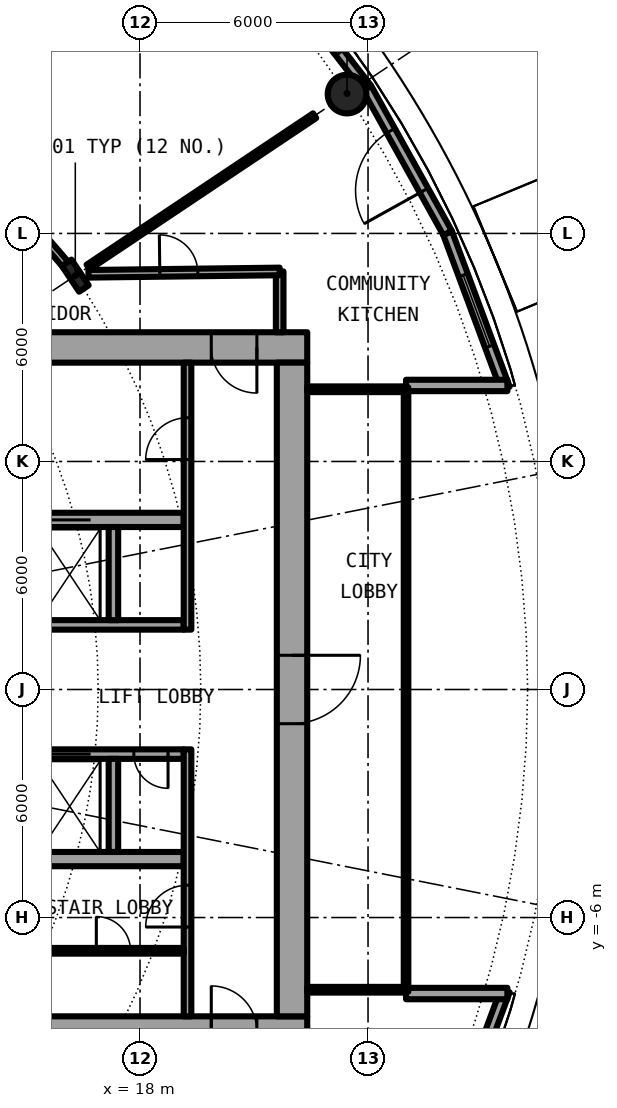
"""IFC4 building model, lengths in metres.
Left out: names, types, materials, properties, quantities, classifications, styles, units other than length and angle.
Written with IfcOpenShell. Run it as: python <this file> out.ifc"""

import sys

from ifc_helpers import new_model, si_unit, direction, frame, frame_2d, origin, origin_2d, place, context, subcontext, project, spatial, rectangle, hollow_circle, i_section, extrude, element, fill, save


model = new_model("IFC4")
c1 = context("Model", 3, precision=1e-05, world=origin(), true_north=direction((0.0, 1.0)))
c2 = subcontext(c1, "Body", "Model", "MODEL_VIEW")
j1 = project(units=[si_unit("LENGTHUNIT", "METRE"), si_unit("PLANEANGLEUNIT", "RADIAN")], contexts=[c1])
p1 = place(None, origin())
s1 = spatial("IfcSite", under=j1, at=p1, CompositionType="ELEMENT")
p2 = place(p1, origin())
s2 = spatial("IfcBuilding", under=s1, at=p2, CompositionType="ELEMENT")
p3 = place(p2, frame((0.0, 0.0, 9.6)))
s3 = spatial("IfcBuildingStorey", under=s2, at=p3, CompositionType="ELEMENT", Elevation=9.6)
p4 = place(p3, frame((23.448, 15.667, 0.0), z_axis=(0.0, 0.0, 1.0), x_axis=(1.0, 0.0, 0.0)))
e1 = element("IfcColumn", 1, at=p4, inside=s3, PredefinedType="COLUMN", context=c2, shape_type="SweptSolid", body=[
    extrude(hollow_circle(Radius=0.508, WallThickness=0.05, at=origin_2d()), origin(), (0.0, 0.0, 1.0), 4.5),
])
p5 = place(p3, frame((16.297, 10.889, 0.0), z_axis=(0.0, 0.0, 1.0), x_axis=(0.831469612303, 0.55557023302, 0.0)))
e2 = element("IfcColumn", 2, at=p5, inside=s3, PredefinedType="COLUMN", context=c2, shape_type="SweptSolid", body=[
    extrude(i_section(OverallWidth=0.303, OverallDepth=0.814, WebThickness=0.021, FlangeThickness=0.04, FilletRadius=0.03, at=origin_2d()), origin(), (0.0, 0.0, 1.0), 4.5),
])
p6 = place(p3, frame((27.61, 7.924, 0.0), z_axis=(0.0, 0.0, 1.0), x_axis=(-0.348003729264, 0.937493148998, 0.0)))
e3 = element("IfcWall", 3, at=p6, inside=s3, PredefinedType="SOLIDWALL", context=c2, shape_type="SweptSolid", body=[
    extrude(rectangle(XDim=4.359, YDim=0.25, at=frame_2d((2.18, 0.0))), origin(), (0.0, 0.0, 1.0), 4.05),
])
p7 = place(p6, frame((1.18, 0.0, 0.9)))
e4 = element("IfcOpeningElement", 4, at=p7, cuts=e3, PredefinedType="OPENING", context=c2, shape_type="SweptSolid", body=[
    extrude(rectangle(XDim=2.0, YDim=2.4, at=frame_2d((1.0, 1.2))), frame((0.0, 0.135, 0.0), z_axis=(0.0, -1.0, 0.0), x_axis=(1.0, 0.0, 0.0)), (0.0, 0.0, 1.0), 0.27),
])
p8 = place(p3, frame((26.093, 12.011, 0.0), z_axis=(0.0, 0.0, 1.0), x_axis=(-0.485761785263, 0.8740912355, 0.0)))
e5 = element("IfcWall", 5, at=p8, inside=s3, PredefinedType="SOLIDWALL", context=c2, shape_type="SweptSolid", body=[
    extrude(rectangle(XDim=4.36, YDim=0.25, at=frame_2d((2.18, 0.0))), origin(), (0.0, 0.0, 1.0), 4.05),
])
p9 = place(p8, frame((1.28, 0.0, 0.0)))
e6 = element("IfcOpeningElement", 6, at=p9, cuts=e5, PredefinedType="OPENING", context=c2, shape_type="SweptSolid", body=[
    extrude(rectangle(XDim=1.8, YDim=2.2, at=frame_2d((0.9, 1.1))), frame((0.0, 0.135, 0.0), z_axis=(0.0, -1.0, 0.0), x_axis=(1.0, 0.0, 0.0)), (0.0, 0.0, 1.0), 0.27),
])
p10 = place(p3, frame((23.975, 15.822, 0.0), z_axis=(0.0, 0.0, 1.0), x_axis=(-0.612637256412, 0.790364214812, 0.0)))
e7 = element("IfcWall", 7, at=p10, inside=s3, PredefinedType="SOLIDWALL", context=c2, shape_type="SweptSolid", body=[
    extrude(rectangle(XDim=4.36, YDim=0.25, at=frame_2d((2.18, 0.0))), origin(), (0.0, 0.0, 1.0), 4.05),
])
p11 = place(p10, frame((1.18, 0.0, 0.9)))
e8 = element("IfcOpeningElement", 8, at=p11, cuts=e7, PredefinedType="OPENING", context=c2, shape_type="SweptSolid", body=[
    extrude(rectangle(XDim=2.0, YDim=2.4, at=frame_2d((1.0, 1.2))), frame((0.0, 0.135, 0.0), z_axis=(0.0, -1.0, 0.0), x_axis=(1.0, 0.0, 0.0)), (0.0, 0.0, 1.0), 0.27),
])
p12 = place(p3, frame((26.093, -12.011, 0.0), z_axis=(0.0, 0.0, 1.0), x_axis=(0.348003729264, 0.937493148998, 0.0)))
e9 = element("IfcWall", 9, at=p12, inside=s3, PredefinedType="SOLIDWALL", context=c2, shape_type="SweptSolid", body=[
    extrude(rectangle(XDim=4.359, YDim=0.25, at=frame_2d((2.18, 0.0))), origin(), (0.0, 0.0, 1.0), 4.05),
])
p13 = place(p12, frame((1.28, 0.0, 0.0)))
e10 = element("IfcOpeningElement", 10, at=p13, cuts=e9, PredefinedType="OPENING", context=c2, shape_type="SweptSolid", body=[
    extrude(rectangle(XDim=1.8, YDim=2.2, at=frame_2d((0.9, 1.1))), frame((0.0, 0.135, 0.0), z_axis=(0.0, -1.0, 0.0), x_axis=(1.0, 0.0, 0.0)), (0.0, 0.0, 1.0), 0.27),
])
for number, where, z_axis, x_axis in (
    (11, (25.0, 8.0, 0.0), (0.0, 0.0, 1.0), (1.0, 0.0, 0.0)),
    (12, (25.0, -8.0, 0.0), (0.0, 0.0, 1.0), (1.0, 0.0, 0.0)),
):
    element("IfcWall", number, at=place(p3, frame(where, z_axis=z_axis, x_axis=x_axis)), inside=s3, PredefinedType="SOLIDWALL", context=c2, shape_type="SweptSolid", body=[
        extrude(rectangle(XDim=2.667, YDim=0.3, at=frame_2d((1.333, 0.0))), origin(), (0.0, 0.0, 1.0), 4.05),
    ])
p14 = place(p3, frame((22.4, 9.0, 0.0), z_axis=(0.0, 0.0, 1.0), x_axis=(-1.0, 0.0, 0.0)))
e13 = element("IfcWall", 13, at=p14, inside=s3, PredefinedType="SHEAR", context=c2, shape_type="SweptSolid", body=[
    extrude(rectangle(XDim=14.2, YDim=0.8, at=frame_2d((7.1, 0.0))), origin(), (0.0, 0.0, 1.0), 4.5),
])
p15 = place(p14, frame((1.325, 0.0, 0.0)))
e14 = element("IfcOpeningElement", 14, at=p15, cuts=e13, PredefinedType="OPENING", context=c2, shape_type="SweptSolid", body=[
    extrude(rectangle(XDim=1.2, YDim=2.3, at=frame_2d((0.6, 1.15))), frame((0.0, 0.41, 0.0), z_axis=(0.0, -1.0, 0.0), x_axis=(1.0, 0.0, 0.0)), (0.0, 0.0, 1.0), 0.82),
])
p16 = place(p3, frame((8.2, -9.0, 0.0), z_axis=(0.0, 0.0, 1.0), x_axis=(1.0, 0.0, 0.0)))
e15 = element("IfcWall", 15, at=p16, inside=s3, PredefinedType="SHEAR", context=c2, shape_type="SweptSolid", body=[
    extrude(rectangle(XDim=14.2, YDim=0.8, at=frame_2d((7.1, 0.0))), origin(), (0.0, 0.0, 1.0), 4.5),
])
p17 = place(p16, frame((11.675, 0.0, 0.0)))
e16 = element("IfcOpeningElement", 16, at=p17, cuts=e15, PredefinedType="OPENING", context=c2, shape_type="SweptSolid", body=[
    extrude(rectangle(XDim=1.2, YDim=2.3, at=frame_2d((0.6, 1.15))), frame((0.0, 0.41, 0.0), z_axis=(0.0, -1.0, 0.0), x_axis=(1.0, 0.0, 0.0)), (0.0, 0.0, 1.0), 0.82),
])
p18 = place(p3, frame((22.0, 8.6, 0.0), z_axis=(0.0, 0.0, 1.0), x_axis=(0.0, -1.0, 0.0)))
e17 = element("IfcWall", 17, at=p18, inside=s3, PredefinedType="SHEAR", context=c2, shape_type="SweptSolid", body=[
    extrude(rectangle(XDim=17.2, YDim=0.8, at=frame_2d((8.6, 0.0))), origin(), (0.0, 0.0, 1.0), 4.5),
])
p19 = place(p18, frame((7.7, 0.0, 0.0)))
e18 = element("IfcOpeningElement", 18, at=p19, cuts=e17, PredefinedType="OPENING", context=c2, shape_type="SweptSolid", body=[
    extrude(rectangle(XDim=1.8, YDim=2.3, at=frame_2d((0.9, 1.15))), frame((0.0, 0.41, 0.0), z_axis=(0.0, -1.0, 0.0), x_axis=(1.0, 0.0, 0.0)), (0.0, 0.0, 1.0), 0.82),
])
p20 = place(p3, frame((9.0, 1.7, 0.0), z_axis=(0.0, 0.0, 1.0), x_axis=(1.0, 0.0, 0.0)))
e19 = element("IfcWall", 19, at=p20, inside=s3, PredefinedType="SHEAR", context=c2, shape_type="SweptSolid", body=[
    extrude(rectangle(XDim=10.15, YDim=0.25, at=frame_2d((5.075, 0.0))), origin(), (0.0, 0.0, 1.0), 4.5),
])
p21 = place(p20, frame((0.387, 0.0, 0.0)))
e20 = element("IfcOpeningElement", 20, at=p21, cuts=e19, PredefinedType="OPENING", context=c2, shape_type="SweptSolid", body=[
    extrude(rectangle(XDim=1.1, YDim=2.3, at=frame_2d((0.55, 1.15))), frame((0.0, 0.135, 0.0), z_axis=(0.0, -1.0, 0.0), x_axis=(1.0, 0.0, 0.0)), (0.0, 0.0, 1.0), 0.27),
])
p22 = place(p20, frame((2.45, 0.0, 0.0)))
e21 = element("IfcOpeningElement", 21, at=p22, cuts=e19, PredefinedType="OPENING", context=c2, shape_type="SweptSolid", body=[
    extrude(rectangle(XDim=1.1, YDim=2.3, at=frame_2d((0.55, 1.15))), frame((0.0, 0.135, 0.0), z_axis=(0.0, -1.0, 0.0), x_axis=(1.0, 0.0, 0.0)), (0.0, 0.0, 1.0), 0.27),
])
p23 = place(p20, frame((4.45, 0.0, 0.0)))
e22 = element("IfcOpeningElement", 22, at=p23, cuts=e19, PredefinedType="OPENING", context=c2, shape_type="SweptSolid", body=[
    extrude(rectangle(XDim=1.1, YDim=2.3, at=frame_2d((0.55, 1.15))), frame((0.0, 0.135, 0.0), z_axis=(0.0, -1.0, 0.0), x_axis=(1.0, 0.0, 0.0)), (0.0, 0.0, 1.0), 0.27),
])
p24 = place(p3, frame((9.0, 4.462, 0.0), z_axis=(0.0, 0.0, 1.0), x_axis=(1.0, 0.0, 0.0)))
e23 = element("IfcWall", 23, at=p24, inside=s3, PredefinedType="SHEAR", context=c2, shape_type="SweptSolid", body=[
    extrude(rectangle(XDim=10.15, YDim=0.375, at=frame_2d((5.075, 0.0))), origin(), (0.0, 0.0, 1.0), 4.5),
])
p25 = place(p24, frame((6.6, 0.0, 0.0)))
e24 = element("IfcOpeningElement", 24, at=p25, cuts=e23, PredefinedType="OPENING", context=c2, shape_type="SweptSolid", body=[
    extrude(rectangle(XDim=1.1, YDim=2.3, at=frame_2d((0.55, 1.15))), frame((0.0, 0.198, 0.0), z_axis=(0.0, -1.0, 0.0), x_axis=(1.0, 0.0, 0.0)), (0.0, 0.0, 1.0), 0.395),
])
p26 = place(p3, frame((17.3, 1.825, 0.0), z_axis=(0.0, 0.0, 1.0), x_axis=(0.0, 1.0, 0.0)))
e25 = element("IfcWall", 25, at=p26, inside=s3, PredefinedType="SOLIDWALL", context=c2, shape_type="SweptSolid", body=[
    extrude(rectangle(XDim=2.45, YDim=0.25, at=frame_2d((1.225, 0.0))), origin(), (0.0, 0.0, 1.0), 4.05),
])
p27 = place(p3, frame((19.25, 1.575, 0.0), z_axis=(0.0, 0.0, 1.0), x_axis=(0.0, 1.0, 0.0)))
e26 = element("IfcWall", 26, at=p27, inside=s3, PredefinedType="SOLIDWALL", context=c2, shape_type="SweptSolid", body=[
    extrude(rectangle(XDim=7.025, YDim=0.2, at=frame_2d((3.513, 0.0))), origin(), (0.0, 0.0, 1.0), 4.05),
])
p28 = place(p27, frame((4.475, 0.0, 0.0)))
e27 = element("IfcOpeningElement", 27, at=p28, cuts=e26, PredefinedType="OPENING", context=c2, shape_type="SweptSolid", body=[
    extrude(rectangle(XDim=1.1, YDim=2.3, at=frame_2d((0.55, 1.15))), frame((0.0, 0.11, 0.0), z_axis=(0.0, -1.0, 0.0), x_axis=(1.0, 0.0, 0.0)), (0.0, 0.0, 1.0), 0.22),
])
p29 = place(p3, frame((19.15, -1.7, 0.0), z_axis=(0.0, 0.0, 1.0), x_axis=(-1.0, 0.0, 0.0)))
e28 = element("IfcWall", 28, at=p29, inside=s3, PredefinedType="SHEAR", context=c2, shape_type="SweptSolid", body=[
    extrude(rectangle(XDim=10.15, YDim=0.25, at=frame_2d((5.075, 0.0))), origin(), (0.0, 0.0, 1.0), 4.5),
])
p30 = place(p29, frame((2.45, 0.0, 0.0)))
e29 = element("IfcOpeningElement", 29, at=p30, cuts=e28, PredefinedType="OPENING", context=c2, shape_type="SweptSolid", body=[
    extrude(rectangle(XDim=1.1, YDim=2.3, at=frame_2d((0.55, 1.15))), frame((0.0, 0.135, 0.0), z_axis=(0.0, -1.0, 0.0), x_axis=(1.0, 0.0, 0.0)), (0.0, 0.0, 1.0), 0.27),
])
p31 = place(p29, frame((8.288, 0.0, 0.0)))
e30 = element("IfcOpeningElement", 30, at=p31, cuts=e28, PredefinedType="OPENING", context=c2, shape_type="SweptSolid", body=[
    extrude(rectangle(XDim=0.9, YDim=2.3, at=frame_2d((0.45, 1.15))), frame((0.0, 0.135, 0.0), z_axis=(0.0, -1.0, 0.0), x_axis=(1.0, 0.0, 0.0)), (0.0, 0.0, 1.0), 0.27),
])
p32 = place(p29, frame((5.275, 0.0, 0.0)))
e31 = element("IfcOpeningElement", 31, at=p32, cuts=e28, PredefinedType="OPENING", context=c2, shape_type="SweptSolid", body=[
    extrude(rectangle(XDim=0.9, YDim=2.3, at=frame_2d((0.45, 1.15))), frame((0.0, 0.135, 0.0), z_axis=(0.0, -1.0, 0.0), x_axis=(1.0, 0.0, 0.0)), (0.0, 0.0, 1.0), 0.27),
])
p33 = place(p29, frame((0.413, 0.0, 0.0)))
e32 = element("IfcOpeningElement", 32, at=p33, cuts=e28, PredefinedType="OPENING", context=c2, shape_type="SweptSolid", body=[
    extrude(rectangle(XDim=0.9, YDim=2.3, at=frame_2d((0.45, 1.15))), frame((0.0, 0.135, 0.0), z_axis=(0.0, -1.0, 0.0), x_axis=(1.0, 0.0, 0.0)), (0.0, 0.0, 1.0), 0.27),
])
p34 = place(p3, frame((9.0, -4.462, 0.0), z_axis=(0.0, 0.0, 1.0), x_axis=(1.0, 0.0, 0.0)))
e33 = element("IfcWall", 33, at=p34, inside=s3, PredefinedType="SHEAR", context=c2, shape_type="SweptSolid", body=[
    extrude(rectangle(XDim=10.15, YDim=0.375, at=frame_2d((5.075, 0.0))), origin(), (0.0, 0.0, 1.0), 4.5),
])
p35 = place(p3, frame((17.3, -1.825, 0.0), z_axis=(0.0, 0.0, 1.0), x_axis=(0.0, -1.0, 0.0)))
e34 = element("IfcWall", 34, at=p35, inside=s3, PredefinedType="SOLIDWALL", context=c2, shape_type="SweptSolid", body=[
    extrude(rectangle(XDim=2.45, YDim=0.25, at=frame_2d((1.225, 0.0))), origin(), (0.0, 0.0, 1.0), 4.05),
])
p36 = place(p3, frame((19.25, -8.6, 0.0), z_axis=(0.0, 0.0, 1.0), x_axis=(0.0, 1.0, 0.0)))
e35 = element("IfcWall", 35, at=p36, inside=s3, PredefinedType="SOLIDWALL", context=c2, shape_type="SweptSolid", body=[
    extrude(rectangle(XDim=7.025, YDim=0.2, at=frame_2d((3.513, 0.0))), origin(), (0.0, 0.0, 1.0), 4.05),
])
p37 = place(p36, frame((2.35, 0.0, 0.0)))
e36 = element("IfcOpeningElement", 36, at=p37, cuts=e35, PredefinedType="OPENING", context=c2, shape_type="SweptSolid", body=[
    extrude(rectangle(XDim=1.1, YDim=2.3, at=frame_2d((0.55, 1.15))), frame((0.0, 0.11, 0.0), z_axis=(0.0, -1.0, 0.0), x_axis=(1.0, 0.0, 0.0)), (0.0, 0.0, 1.0), 0.22),
])
p38 = place(p3, frame((15.45, -6.875, 0.0), z_axis=(0.0, 0.0, 1.0), x_axis=(1.0, 0.0, 0.0)))
e37 = element("IfcWall", 37, at=p38, inside=s3, PredefinedType="PARTITIONING", context=c2, shape_type="SweptSolid", body=[
    extrude(rectangle(XDim=3.7, YDim=0.15, at=frame_2d((1.85, 0.0))), origin(), (0.0, 0.0, 1.0), 4.05),
])
p39 = place(p38, frame((1.4, 0.0, 0.0)))
e38 = element("IfcOpeningElement", 38, at=p39, cuts=e37, PredefinedType="OPENING", context=c2, shape_type="SweptSolid", body=[
    extrude(rectangle(XDim=0.9, YDim=2.3, at=frame_2d((0.45, 1.15))), frame((0.0, 0.085, 0.0), z_axis=(0.0, -1.0, 0.0), x_axis=(1.0, 0.0, 0.0)), (0.0, 0.0, 1.0), 0.17),
])
for number, where, z_axis, x_axis in (
    (39, (22.4, -7.9, 0.0), (0.0, 0.0, 1.0), (1.0, 0.0, 0.0)),
    (40, (22.4, 7.9, 0.0), (0.0, 0.0, 1.0), (1.0, 0.0, 0.0)),
):
    element("IfcWall", number, at=place(p3, frame(where, z_axis=z_axis, x_axis=x_axis)), inside=s3, PredefinedType="PARTITIONING", context=c2, shape_type="SweptSolid", body=[
        extrude(rectangle(XDim=2.54, YDim=0.15, at=frame_2d((1.27, 0.0))), origin(), (0.0, 0.0, 1.0), 4.05),
    ])
p40 = place(p3, frame((25.0, -7.95, 0.0), z_axis=(0.0, 0.0, 1.0), x_axis=(0.0, 1.0, 0.0)))
e41 = element("IfcWall", 41, at=p40, inside=s3, PredefinedType="PARTITIONING", context=c2, shape_type="SweptSolid", body=[
    extrude(rectangle(XDim=15.9, YDim=0.12, at=frame_2d((7.95, 0.0))), origin(), (0.0, 0.0, 1.0), 4.05),
])
p41 = place(p40, frame((0.95, 0.0, 0.1)))
e42 = element("IfcOpeningElement", 42, at=p41, cuts=e41, PredefinedType="OPENING", context=c2, shape_type="SweptSolid", body=[
    extrude(rectangle(XDim=14.0, YDim=3.7, at=frame_2d((7.0, 1.85))), frame((0.0, 0.07, 0.0), z_axis=(0.0, -1.0, 0.0), x_axis=(1.0, 0.0, 0.0)), (0.0, 0.0, 1.0), 0.14),
])
p42 = place(p3, frame((21.675, 9.4, 0.0), z_axis=(0.0, 0.0, 1.0), x_axis=(0.0, 1.0, 0.0)))
e43 = element("IfcWall", 43, at=p42, inside=s3, PredefinedType="PARTITIONING", context=c2, shape_type="SweptSolid", body=[
    extrude(rectangle(XDim=1.6, YDim=0.2, at=frame_2d((0.8, 0.0))), origin(), (0.0, 0.0, 1.0), 4.05),
])
p43 = place(p3, frame((16.635, 11.115, 0.0), z_axis=(0.0, 0.0, 1.0), x_axis=(0.831431488123, 0.555627285648, 0.0)))
e44 = element("IfcWall", 44, at=p43, inside=s3, PredefinedType="PARTITIONING", context=c2, shape_type="SweptSolid", body=[
    extrude(rectangle(XDim=7.168, YDim=0.15, at=frame_2d((3.584, 0.0))), origin(), (0.0, 0.0, 1.0), 4.05),
])
p44 = place(p3, frame((16.643, 10.938, 0.0), z_axis=(0.0, 0.0, 1.0), x_axis=(0.999924074118, 0.012322580895, 0.0)))
e45 = element("IfcWall", 45, at=p44, inside=s3, PredefinedType="PARTITIONING", context=c2, shape_type="SweptSolid", body=[
    extrude(rectangle(XDim=5.032, YDim=0.2, at=frame_2d((2.516, 0.0))), origin(), (0.0, 0.0, 1.0), 4.05),
])
p45 = place(p44, frame((1.878, 0.0, 0.0)))
e46 = element("IfcOpeningElement", 46, at=p45, cuts=e45, PredefinedType="OPENING", context=c2, shape_type="SweptSolid", body=[
    extrude(rectangle(XDim=1.0, YDim=2.3, at=frame_2d((0.5, 1.15))), frame((0.0, 0.11, 0.0), z_axis=(0.0, -1.0, 0.0), x_axis=(1.0, 0.0, 0.0)), (0.0, 0.0, 1.0), 0.22),
])
p46 = place(p3, frame((13.163, 14.523, 0.0), z_axis=(0.0, 0.0, 1.0), x_axis=(0.653077876854, -0.757290754443, 0.0)))
e47 = element("IfcWall", 47, at=p46, inside=s3, PredefinedType="PARTITIONING", context=c2, shape_type="SweptSolid", body=[
    extrude(rectangle(XDim=4.646, YDim=0.2, at=frame_2d((2.323, 0.0))), origin(), (0.0, 0.0, 1.0), 3.63),
])
p47 = place(p7, origin())
e48 = element("IfcWindow", 48, at=p47, inside=s3, PartitioningType="SINGLE_PANEL", PredefinedType="WINDOW", context=c2, shape_type="SweptSolid", body=[
    extrude(rectangle(XDim=2.0, YDim=2.4, at=frame_2d((1.0, 1.2))), frame((0.0, 0.03, 0.0), z_axis=(0.0, -1.0, 0.0), x_axis=(1.0, 0.0, 0.0)), (0.0, 0.0, 1.0), 0.06),
])
fill(e4, e48)
p48 = place(p9, origin())
e49 = element("IfcDoor", 49, at=p48, inside=s3, OperationType="SINGLE_SWING_LEFT", PredefinedType="DOOR", context=c2, shape_type="SweptSolid", body=[
    extrude(rectangle(XDim=1.8, YDim=2.2, at=frame_2d((0.9, 1.1))), frame((0.0, 0.025, 0.0), z_axis=(0.0, -1.0, 0.0), x_axis=(1.0, 0.0, 0.0)), (0.0, 0.0, 1.0), 0.05),
])
fill(e6, e49)
p49 = place(p11, origin())
e50 = element("IfcWindow", 50, at=p49, inside=s3, PartitioningType="SINGLE_PANEL", PredefinedType="WINDOW", context=c2, shape_type="SweptSolid", body=[
    extrude(rectangle(XDim=2.0, YDim=2.4, at=frame_2d((1.0, 1.2))), frame((0.0, 0.03, 0.0), z_axis=(0.0, -1.0, 0.0), x_axis=(1.0, 0.0, 0.0)), (0.0, 0.0, 1.0), 0.06),
])
fill(e8, e50)
p50 = place(p25, origin())
e51 = element("IfcDoor", 51, at=p50, inside=s3, OperationType="DOUBLE_DOOR_SLIDING", PredefinedType="DOOR", context=c2, shape_type="SweptSolid", body=[
    extrude(rectangle(XDim=1.1, YDim=2.3, at=frame_2d((0.55, 1.15))), frame((0.0, 0.025, 0.0), z_axis=(0.0, -1.0, 0.0), x_axis=(1.0, 0.0, 0.0)), (0.0, 0.0, 1.0), 0.05),
])
fill(e24, e51)
p51 = place(p30, origin())
e52 = element("IfcDoor", 52, at=p51, inside=s3, OperationType="DOUBLE_DOOR_SLIDING", PredefinedType="DOOR", context=c2, shape_type="SweptSolid", body=[
    extrude(rectangle(XDim=1.1, YDim=2.3, at=frame_2d((0.55, 1.15))), frame((0.0, 0.025, 0.0), z_axis=(0.0, -1.0, 0.0), x_axis=(1.0, 0.0, 0.0)), (0.0, 0.0, 1.0), 0.05),
])
fill(e29, e52)
p52 = place(p33, origin())
e53 = element("IfcDoor", 53, at=p52, inside=s3, OperationType="SINGLE_SWING_RIGHT", PredefinedType="DOOR", context=c2, shape_type="SweptSolid", body=[
    extrude(rectangle(XDim=0.9, YDim=2.3, at=frame_2d((0.45, 1.15))), frame((0.0, 0.025, 0.0), z_axis=(0.0, -1.0, 0.0), x_axis=(1.0, 0.0, 0.0)), (0.0, 0.0, 1.0), 0.05),
])
fill(e32, e53)
p53 = place(p39, origin())
e54 = element("IfcDoor", 54, at=p53, inside=s3, OperationType="SINGLE_SWING_LEFT", PredefinedType="DOOR", context=c2, shape_type="SweptSolid", body=[
    extrude(rectangle(XDim=0.9, YDim=2.3, at=frame_2d((0.45, 1.15))), frame((0.0, 0.025, 0.0), z_axis=(0.0, -1.0, 0.0), x_axis=(1.0, 0.0, 0.0)), (0.0, 0.0, 1.0), 0.05),
])
fill(e38, e54)
p54 = place(p28, origin())
e55 = element("IfcDoor", 55, at=p54, inside=s3, OperationType="SINGLE_SWING_LEFT", PredefinedType="DOOR", context=c2, shape_type="SweptSolid", body=[
    extrude(rectangle(XDim=1.1, YDim=2.3, at=frame_2d((0.55, 1.15))), frame((0.0, 0.025, 0.0), z_axis=(0.0, -1.0, 0.0), x_axis=(1.0, 0.0, 0.0)), (0.0, 0.0, 1.0), 0.05),
])
fill(e27, e55)
p55 = place(p37, origin())
e56 = element("IfcDoor", 56, at=p55, inside=s3, OperationType="SINGLE_SWING_RIGHT", PredefinedType="DOOR", context=c2, shape_type="SweptSolid", body=[
    extrude(rectangle(XDim=1.1, YDim=2.3, at=frame_2d((0.55, 1.15))), frame((0.0, 0.025, 0.0), z_axis=(0.0, -1.0, 0.0), x_axis=(1.0, 0.0, 0.0)), (0.0, 0.0, 1.0), 0.05),
])
fill(e36, e56)
p56 = place(p15, origin())
e57 = element("IfcDoor", 57, at=p56, inside=s3, OperationType="SINGLE_SWING_RIGHT", PredefinedType="DOOR", context=c2, shape_type="SweptSolid", body=[
    extrude(rectangle(XDim=1.2, YDim=2.3, at=frame_2d((0.6, 1.15))), frame((0.0, 0.025, 0.0), z_axis=(0.0, -1.0, 0.0), x_axis=(1.0, 0.0, 0.0)), (0.0, 0.0, 1.0), 0.05),
])
fill(e14, e57)
p57 = place(p19, origin())
e58 = element("IfcDoor", 58, at=p57, inside=s3, OperationType="SINGLE_SWING_LEFT", PredefinedType="DOOR", context=c2, shape_type="SweptSolid", body=[
    extrude(rectangle(XDim=1.8, YDim=2.3, at=frame_2d((0.9, 1.15))), frame((0.0, 0.025, 0.0), z_axis=(0.0, -1.0, 0.0), x_axis=(1.0, 0.0, 0.0)), (0.0, 0.0, 1.0), 0.05),
])
fill(e18, e58)
p58 = place(p41, origin())
e59 = element("IfcWindow", 59, at=p58, inside=s3, PartitioningType="SINGLE_PANEL", PredefinedType="WINDOW", context=c2, shape_type="SweptSolid", body=[
    extrude(rectangle(XDim=14.0, YDim=3.7, at=frame_2d((7.0, 1.85))), frame((0.0, 0.03, 0.0), z_axis=(0.0, -1.0, 0.0), x_axis=(1.0, 0.0, 0.0)), (0.0, 0.0, 1.0), 0.06),
])
fill(e42, e59)
p59 = place(p45, origin())
e60 = element("IfcDoor", 60, at=p59, inside=s3, OperationType="SINGLE_SWING_LEFT", PredefinedType="DOOR", context=c2, shape_type="SweptSolid", body=[
    extrude(rectangle(XDim=1.0, YDim=2.3, at=frame_2d((0.5, 1.15))), frame((0.0, 0.025, 0.0), z_axis=(0.0, -1.0, 0.0), x_axis=(1.0, 0.0, 0.0)), (0.0, 0.0, 1.0), 0.05),
])
fill(e46, e60)
save(model, sys.argv[1])
